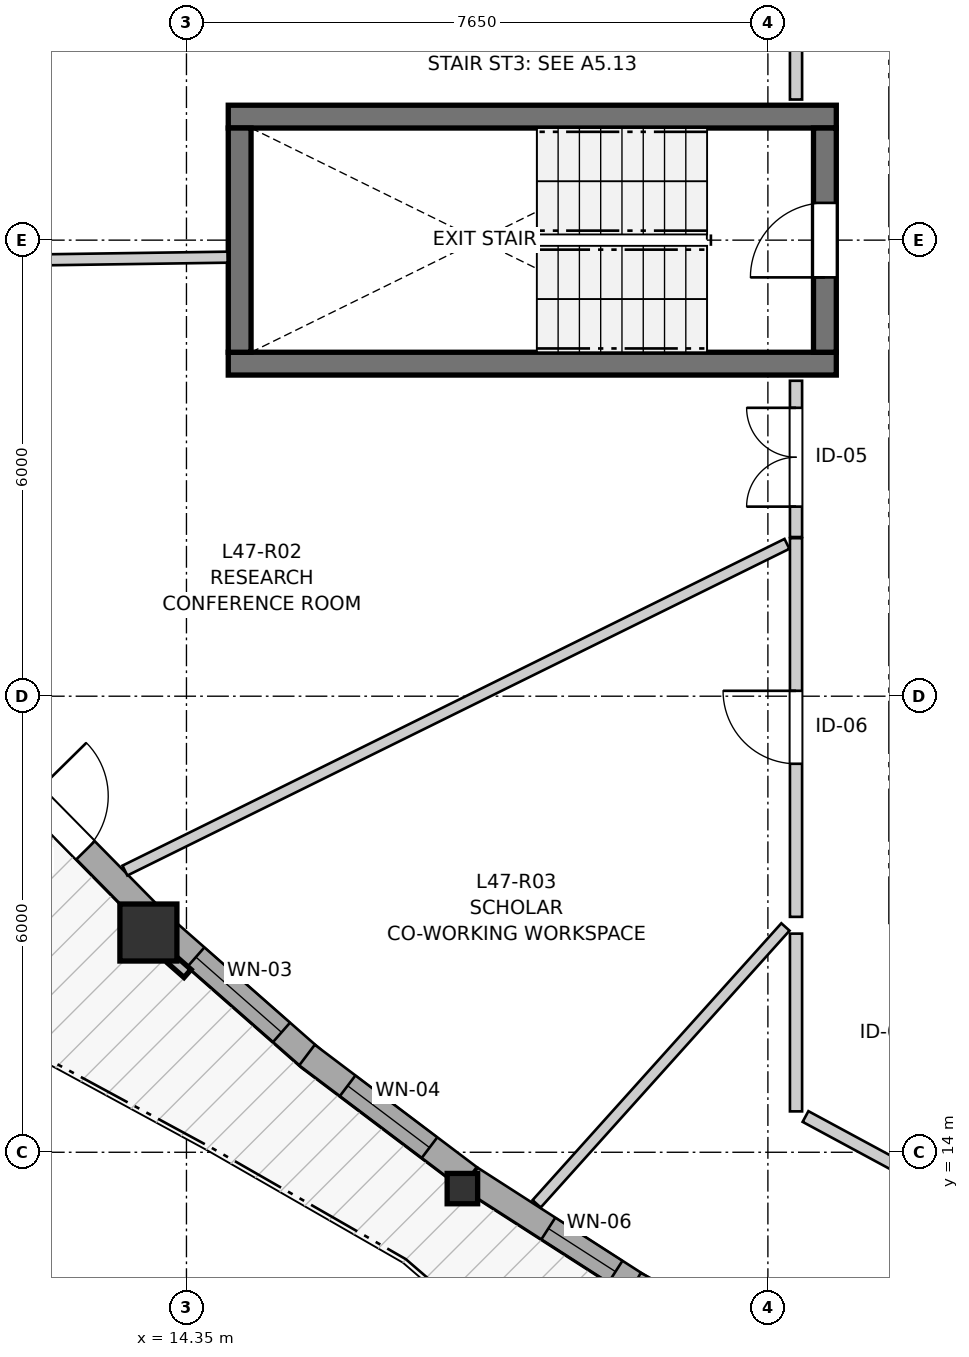
"""IFC4 building model, lengths in metres.
Left out: names, types, materials, properties, quantities, classifications, styles, units other than length and angle.
Written with IfcOpenShell. Run it as: python <this file> out.ifc"""

import sys

from ifc_helpers import new_model, si_unit, direction, frame, frame_2d, origin, origin_2d, place, context, subcontext, project, spatial, rectangle, i_section, extrude, source, transform, mapped, element, fill, save


model = new_model("IFC4")
c1 = context("Model", 3, precision=1e-05, world=origin(), true_north=direction((0.0, 1.0)))
c2 = subcontext(c1, "Body", "Model", "MODEL_VIEW")
j1 = project(units=[si_unit("LENGTHUNIT", "METRE"), si_unit("PLANEANGLEUNIT", "RADIAN")], contexts=[c1])
p1 = place(None, origin())
s1 = spatial("IfcSite", under=j1, at=p1, CompositionType="ELEMENT")
p2 = place(p1, origin())
s2 = spatial("IfcBuilding", under=s1, at=p2, CompositionType="ELEMENT")
p3 = place(p2, frame((0.0, 0.0, 158.6)))
s3 = spatial("IfcBuildingStorey", under=s2, at=p3, CompositionType="ELEMENT", Elevation=158.6)
for number, where, z_axis, x_axis in (
    (1, (14.9, 24.375, 0.0), (0.0, 0.0, 1.0), (1.0, 0.0, 0.0)),
    (2, (22.9, 27.625, 0.0), (0.0, 0.0, 1.0), (-1.0, 0.0, 0.0)),
):
    element("IfcWall", number, at=place(p3, frame(where, z_axis=z_axis, x_axis=x_axis)), inside=s3, PredefinedType="SHEAR", context=c2, shape_type="SweptSolid", body=[
        extrude(rectangle(XDim=8.0, YDim=0.3, at=frame_2d((4.0, 0.0))), origin(), (0.0, 0.0, 1.0), 2.95),
    ])
p4 = place(p3, frame((15.05, 27.475, 0.0), z_axis=(0.0, 0.0, 1.0), x_axis=(0.0, -1.0, 0.0)))
e3 = element("IfcWall", 3, at=p4, inside=s3, PredefinedType="SHEAR", context=c2, shape_type="SweptSolid", body=[
    extrude(rectangle(XDim=2.95, YDim=0.3, at=frame_2d((1.475, 0.0))), origin(), (0.0, 0.0, 1.0), 2.95),
])
p5 = place(p3, frame((22.75, 24.525, 0.0), z_axis=(0.0, 0.0, 1.0), x_axis=(0.0, 1.0, 0.0)))
e4 = element("IfcWall", 4, at=p5, inside=s3, PredefinedType="SHEAR", context=c2, shape_type="SweptSolid", body=[
    extrude(rectangle(XDim=2.95, YDim=0.3, at=frame_2d((1.475, 0.0))), origin(), (0.0, 0.0, 1.0), 2.95),
])
p6 = place(p5, frame((0.985, 0.0, 0.0)))
e5 = element("IfcOpeningElement", 5, at=p6, cuts=e4, PredefinedType="OPENING", context=c2, shape_type="SweptSolid", body=[
    extrude(rectangle(XDim=0.98, YDim=2.15, at=frame_2d((0.49, 1.075))), frame((0.0, 0.16, 0.0), z_axis=(0.0, -1.0, 0.0), x_axis=(1.0, 0.0, 0.0)), (0.0, 0.0, 1.0), 0.32),
])
m1 = source(origin(), c2, "Body", "SweptSolid", [
    extrude(rectangle(XDim=0.75, YDim=0.75, at=origin_2d()), origin(), (0.0, 0.0, 1.0), 2.95),
])
p7 = place(p3, frame((13.849, 16.891, 0.0), z_axis=(0.0, 0.0, 1.0), x_axis=(1.0, 0.0, 0.0)))
e6 = element("IfcColumn", 6, at=p7, inside=s3, PredefinedType="COLUMN", context=c2, shape_type="MappedRepresentation", body=[
    mapped(m1, transform((0.0, 0.0, 0.0), x_axis=(1.0, 0.0, 0.0), y_axis=(0.0, 1.0, 0.0), z_axis=(0.0, 0.0, 1.0), scale=1.0)),
])
m2 = source(origin(), c2, "Body", "SweptSolid", [
    extrude(i_section(OverallWidth=0.401, OverallDepth=0.399, WebThickness=0.023, FlangeThickness=0.036, FilletRadius=0.015, at=origin_2d()), origin(), (0.0, 0.0, 1.0), 2.95),
])
p8 = place(p3, frame((17.98, 13.522, 0.0), z_axis=(0.0, 0.0, 1.0), x_axis=(1.0, 0.0, 0.0)))
e7 = element("IfcColumn", 7, at=p8, inside=s3, PredefinedType="PILASTER", context=c2, shape_type="MappedRepresentation", body=[
    mapped(m2, transform((0.0, 0.0, 0.0), x_axis=(1.0, 0.0, 0.0), y_axis=(0.0, 1.0, 0.0), z_axis=(0.0, 0.0, 1.0), scale=1.0)),
])
p9 = place(p3, frame((12.031, 18.98, 0.0), z_axis=(0.0, 0.0, 1.0), x_axis=(0.701518749222, -0.712650997677, 0.0)))
e8 = element("IfcWall", 8, at=p9, inside=s3, PredefinedType="SOLIDWALL", context=c2, shape_type="SweptSolid", body=[
    extrude(rectangle(XDim=2.61, YDim=0.34, at=frame_2d((1.305, 0.0))), origin(), (0.0, 0.0, 1.0), 2.53),
])
p10 = place(p9, frame((0.413, 0.0, 0.0)))
e9 = element("IfcOpeningElement", 9, at=p10, cuts=e8, PredefinedType="OPENING", context=c2, shape_type="SweptSolid", body=[
    extrude(rectangle(XDim=1.0, YDim=2.1, at=frame_2d((0.5, 1.05))), frame((0.0, 0.18, 0.0), z_axis=(0.0, -1.0, 0.0), x_axis=(1.0, 0.0, 0.0)), (0.0, 0.0, 1.0), 0.36),
])
p11 = place(p3, frame((14.078, 16.916, 0.0), z_axis=(0.0, 0.0, 1.0), x_axis=(0.751177768463, -0.660099962253, 0.0)))
e10 = element("IfcWall", 10, at=p11, inside=s3, PredefinedType="SOLIDWALL", context=c2, shape_type="SweptSolid", body=[
    extrude(rectangle(XDim=2.565, YDim=0.34, at=frame_2d((1.283, 0.0))), origin(), (0.0, 0.0, 1.0), 2.53),
])
p12 = place(p11, frame((0.528, 0.0, 0.82)))
e11 = element("IfcOpeningElement", 11, at=p12, cuts=e10, PredefinedType="OPENING", context=c2, shape_type="SweptSolid", body=[
    extrude(rectangle(XDim=1.5, YDim=1.45, at=frame_2d((0.75, 0.725))), frame((0.0, 0.18, 0.0), z_axis=(0.0, -1.0, 0.0), x_axis=(1.0, 0.0, 0.0)), (0.0, 0.0, 1.0), 0.36),
])
p13 = place(p3, frame((15.936, 15.279, 0.0), z_axis=(0.0, 0.0, 1.0), x_axis=(0.798020729511, -0.602629998649, 0.0)))
e12 = element("IfcWall", 12, at=p13, inside=s3, PredefinedType="SOLIDWALL", context=c2, shape_type="SweptSolid", body=[
    extrude(rectangle(XDim=2.67, YDim=0.34, at=frame_2d((1.335, 0.0))), origin(), (0.0, 0.0, 1.0), 2.53),
])
p14 = place(p13, frame((0.67, 0.0, 0.82)))
e13 = element("IfcOpeningElement", 13, at=p14, cuts=e12, PredefinedType="OPENING", context=c2, shape_type="SweptSolid", body=[
    extrude(rectangle(XDim=1.35, YDim=1.45, at=frame_2d((0.675, 0.725))), frame((0.0, 0.18, 0.0), z_axis=(0.0, -1.0, 0.0), x_axis=(1.0, 0.0, 0.0)), (0.0, 0.0, 1.0), 0.36),
])
p15 = place(p3, frame((18.089, 13.654, 0.0), z_axis=(0.0, 0.0, 1.0), x_axis=(0.841241207466, -0.540659995617, 0.0)))
e14 = element("IfcWall", 14, at=p15, inside=s3, PredefinedType="SOLIDWALL", context=c2, shape_type="SweptSolid", body=[
    extrude(rectangle(XDim=2.655, YDim=0.34, at=frame_2d((1.328, 0.0))), origin(), (0.0, 0.0, 1.0), 2.53),
])
p16 = place(p15, frame((1.215, 0.0, 0.82)))
e15 = element("IfcOpeningElement", 15, at=p16, cuts=e14, PredefinedType="OPENING", context=c2, shape_type="SweptSolid", body=[
    extrude(rectangle(XDim=1.05, YDim=1.45, at=frame_2d((0.525, 0.725))), frame((0.0, 0.18, 0.0), z_axis=(0.0, -1.0, 0.0), x_axis=(1.0, 0.0, 0.0)), (0.0, 0.0, 1.0), 0.36),
])
p17 = place(p3, frame((20.246, 12.264, 0.0), z_axis=(0.0, 0.0, 1.0), x_axis=(0.879813837033, -0.475318432385, 0.0)))
e16 = element("IfcWall", 16, at=p17, inside=s3, PredefinedType="SOLIDWALL", context=c2, shape_type="SweptSolid", body=[
    extrude(rectangle(XDim=2.52, YDim=0.34, at=frame_2d((1.26, 0.0))), origin(), (0.0, 0.0, 1.0), 2.53),
])
p18 = place(p17, frame((0.74, 0.0, 0.82)))
e17 = element("IfcOpeningElement", 17, at=p18, cuts=e16, PredefinedType="OPENING", context=c2, shape_type="SweptSolid", body=[
    extrude(rectangle(XDim=1.05, YDim=1.45, at=frame_2d((0.525, 0.725))), frame((0.0, 0.18, 0.0), z_axis=(0.0, -1.0, 0.0), x_axis=(1.0, 0.0, 0.0)), (0.0, 0.0, 1.0), 0.36),
])
p19 = place(p3, frame((22.37, 27.85, 0.0), z_axis=(0.0, 0.0, 1.0), x_axis=(0.0, 1.0, 0.0)))
e18 = element("IfcWall", 18, at=p19, inside=s3, PredefinedType="PARTITIONING", context=c2, shape_type="SweptSolid", body=[
    extrude(rectangle(XDim=5.294, YDim=0.16, at=frame_2d((2.647, 0.0))), origin(), (0.0, 0.0, 1.0), 2.95),
])
p20 = place(p19, frame((2.341, 0.0, 0.0)))
e19 = element("IfcOpeningElement", 19, at=p20, cuts=e18, PredefinedType="OPENING", context=c2, shape_type="SweptSolid", body=[
    extrude(rectangle(XDim=1.3, YDim=2.1, at=frame_2d((0.65, 1.05))), frame((0.0, 0.09, 0.0), z_axis=(0.0, -1.0, 0.0), x_axis=(1.0, 0.0, 0.0)), (0.0, 0.0, 1.0), 0.18),
])
p21 = place(p3, frame((22.37, 17.097, 0.0), z_axis=(0.0, 0.0, 1.0), x_axis=(0.0, 1.0, 0.0)))
e20 = element("IfcWall", 20, at=p21, inside=s3, PredefinedType="PARTITIONING", context=c2, shape_type="SweptSolid", body=[
    extrude(rectangle(XDim=4.982, YDim=0.16, at=frame_2d((2.491, 0.0))), origin(), (0.0, 0.0, 1.0), 2.95),
])
p22 = place(p21, frame((2.014, 0.0, 0.0)))
e21 = element("IfcOpeningElement", 21, at=p22, cuts=e20, PredefinedType="OPENING", context=c2, shape_type="SweptSolid", body=[
    extrude(rectangle(XDim=0.96, YDim=2.1, at=frame_2d((0.48, 1.05))), frame((0.0, 0.09, 0.0), z_axis=(0.0, -1.0, 0.0), x_axis=(1.0, 0.0, 0.0)), (0.0, 0.0, 1.0), 0.18),
])
p23 = place(p3, frame((22.37, 22.094, 0.0), z_axis=(0.0, 0.0, 1.0), x_axis=(0.0, 1.0, 0.0)))
e22 = element("IfcWall", 22, at=p23, inside=s3, PredefinedType="PARTITIONING", context=c2, shape_type="SweptSolid", body=[
    extrude(rectangle(XDim=2.056, YDim=0.16, at=frame_2d((1.028, 0.0))), origin(), (0.0, 0.0, 1.0), 2.95),
])
p24 = place(p23, frame((0.4, 0.0, 0.0)))
e23 = element("IfcOpeningElement", 23, at=p24, cuts=e22, PredefinedType="OPENING", context=c2, shape_type="SweptSolid", body=[
    extrude(rectangle(XDim=1.3, YDim=2.1, at=frame_2d((0.65, 1.05))), frame((0.0, 0.09, 0.0), z_axis=(0.0, -1.0, 0.0), x_axis=(1.0, 0.0, 0.0)), (0.0, 0.0, 1.0), 0.18),
])
p25 = place(p3, frame((13.54, 17.706, 0.0), z_axis=(0.0, 0.0, 1.0), x_axis=(0.896762400541, 0.442512369291, 0.0)))
e24 = element("IfcWall", 24, at=p25, inside=s3, PredefinedType="PARTITIONING", context=c2, shape_type="SweptSolid", body=[
    extrude(rectangle(XDim=9.713, YDim=0.145, at=frame_2d((4.857, 0.0))), origin(), (0.0, 0.0, 1.0), 2.95),
])
p26 = place(p3, frame((7.689, 25.671, 0.0), z_axis=(0.0, 0.0, 1.0), x_axis=(0.999894747293, 0.014508422953, 0.0)))
e25 = element("IfcWall", 25, at=p26, inside=s3, PredefinedType="PARTITIONING", context=c2, shape_type="SweptSolid", body=[
    extrude(rectangle(XDim=7.202, YDim=0.145, at=frame_2d((3.601, 0.0))), origin(), (0.0, 0.0, 1.0), 2.95),
])
p27 = place(p3, frame((18.957, 13.322, 0.0), z_axis=(0.0, 0.0, 1.0), x_axis=(0.66841369867, 0.743789706456, 0.0)))
e26 = element("IfcWall", 26, at=p27, inside=s3, PredefinedType="PARTITIONING", context=c2, shape_type="SweptSolid", body=[
    extrude(rectangle(XDim=4.897, YDim=0.145, at=frame_2d((2.449, 0.0))), origin(), (0.0, 0.0, 1.0), 2.95),
])
p28 = place(p3, frame((22.37, 14.538, 0.0), z_axis=(0.0, 0.0, 1.0), x_axis=(0.0, 1.0, 0.0)))
e27 = element("IfcWall", 27, at=p28, inside=s3, PredefinedType="PARTITIONING", context=c2, shape_type="SweptSolid", body=[
    extrude(rectangle(XDim=2.338, YDim=0.16, at=frame_2d((1.169, 0.0))), origin(), (0.0, 0.0, 1.0), 2.95),
])
p29 = place(p3, frame((22.495, 14.47, 0.0), z_axis=(0.0, 0.0, 1.0), x_axis=(0.879828765098, -0.475290799517, 0.0)))
e28 = element("IfcWall", 28, at=p29, inside=s3, PredefinedType="PARTITIONING", context=c2, shape_type="SweptSolid", body=[
    extrude(rectangle(XDim=1.625, YDim=0.16, at=frame_2d((0.812, 0.0))), origin(), (0.0, 0.0, 1.0), 2.95),
])
m3 = source(origin(), c2, "Body", "SweptSolid", [
    extrude(rectangle(XDim=1.5, YDim=1.45, at=frame_2d((0.75, 0.725))), frame((0.0, 0.03, 0.0), z_axis=(0.0, -1.0, 0.0), x_axis=(1.0, 0.0, 0.0)), (0.0, 0.0, 1.0), 0.06),
])
p30 = place(p12, origin())
e29 = element("IfcWindow", 29, at=p30, inside=s3, PartitioningType="SINGLE_PANEL", PredefinedType="WINDOW", context=c2, shape_type="MappedRepresentation", body=[
    mapped(m3, transform((0.0, 0.0, 0.0), x_axis=(1.0, 0.0, 0.0), y_axis=(0.0, 1.0, 0.0), z_axis=(0.0, 0.0, 1.0), scale=1.0)),
])
fill(e11, e29)
m4 = source(origin(), c2, "Body", "SweptSolid", [
    extrude(rectangle(XDim=1.35, YDim=1.45, at=frame_2d((0.675, 0.725))), frame((0.0, 0.03, 0.0), z_axis=(0.0, -1.0, 0.0), x_axis=(1.0, 0.0, 0.0)), (0.0, 0.0, 1.0), 0.06),
])
p31 = place(p14, origin())
e30 = element("IfcWindow", 30, at=p31, inside=s3, PartitioningType="SINGLE_PANEL", PredefinedType="WINDOW", context=c2, shape_type="MappedRepresentation", body=[
    mapped(m4, transform((0.0, 0.0, 0.0), x_axis=(1.0, 0.0, 0.0), y_axis=(0.0, 1.0, 0.0), z_axis=(0.0, 0.0, 1.0), scale=1.0)),
])
fill(e13, e30)
m5 = source(origin(), c2, "Body", "SweptSolid", [
    extrude(rectangle(XDim=1.05, YDim=1.45, at=frame_2d((0.525, 0.725))), frame((0.0, 0.03, 0.0), z_axis=(0.0, -1.0, 0.0), x_axis=(1.0, 0.0, 0.0)), (0.0, 0.0, 1.0), 0.06),
])
p32 = place(p16, origin())
e31 = element("IfcWindow", 31, at=p32, inside=s3, PartitioningType="SINGLE_PANEL", PredefinedType="WINDOW", context=c2, shape_type="MappedRepresentation", body=[
    mapped(m5, transform((0.0, 0.0, 0.0), x_axis=(1.0, 0.0, 0.0), y_axis=(0.0, 1.0, 0.0), z_axis=(0.0, 0.0, 1.0), scale=1.0)),
])
fill(e15, e31)
m6 = source(origin(), c2, "Body", "SweptSolid", [
    extrude(rectangle(XDim=1.0, YDim=2.1, at=frame_2d((0.5, 1.05))), frame((0.0, 0.025, 0.0), z_axis=(0.0, -1.0, 0.0), x_axis=(1.0, 0.0, 0.0)), (0.0, 0.0, 1.0), 0.05),
])
p33 = place(p10, origin())
e32 = element("IfcDoor", 32, at=p33, inside=s3, OperationType="SINGLE_SWING_LEFT", PredefinedType="DOOR", context=c2, shape_type="MappedRepresentation", body=[
    mapped(m6, transform((0.0, 0.0, 0.0), x_axis=(1.0, 0.0, 0.0), y_axis=(0.0, 1.0, 0.0), z_axis=(0.0, 0.0, 1.0), scale=1.0)),
])
fill(e9, e32)
m7 = source(origin(), c2, "Body", "SweptSolid", [
    extrude(rectangle(XDim=0.98, YDim=2.15, at=frame_2d((0.49, 1.075))), frame((0.0, 0.025, 0.0), z_axis=(0.0, -1.0, 0.0), x_axis=(1.0, 0.0, 0.0)), (0.0, 0.0, 1.0), 0.05),
])
p34 = place(p6, origin())
e33 = element("IfcDoor", 33, at=p34, inside=s3, OperationType="SINGLE_SWING_LEFT", PredefinedType="DOOR", context=c2, shape_type="MappedRepresentation", body=[
    mapped(m7, transform((0.0, 0.0, 0.0), x_axis=(1.0, 0.0, 0.0), y_axis=(0.0, 1.0, 0.0), z_axis=(0.0, 0.0, 1.0), scale=1.0)),
])
fill(e5, e33)
m8 = source(origin(), c2, "Body", "SweptSolid", [
    extrude(rectangle(XDim=0.96, YDim=2.1, at=frame_2d((0.48, 1.05))), frame((0.0, 0.025, 0.0), z_axis=(0.0, -1.0, 0.0), x_axis=(1.0, 0.0, 0.0)), (0.0, 0.0, 1.0), 0.05),
])
p35 = place(p22, origin())
e34 = element("IfcDoor", 34, at=p35, inside=s3, OperationType="SINGLE_SWING_RIGHT", PredefinedType="DOOR", context=c2, shape_type="MappedRepresentation", body=[
    mapped(m8, transform((0.0, 0.0, 0.0), x_axis=(1.0, 0.0, 0.0), y_axis=(0.0, 1.0, 0.0), z_axis=(0.0, 0.0, 1.0), scale=1.0)),
])
fill(e21, e34)
m9 = source(origin(), c2, "Body", "SweptSolid", [
    extrude(rectangle(XDim=1.3, YDim=2.1, at=frame_2d((0.65, 1.05))), frame((0.0, 0.025, 0.0), z_axis=(0.0, -1.0, 0.0), x_axis=(1.0, 0.0, 0.0)), (0.0, 0.0, 1.0), 0.05),
])
p36 = place(p24, origin())
e35 = element("IfcDoor", 35, at=p36, inside=s3, OperationType="DOUBLE_DOOR_SINGLE_SWING", PredefinedType="DOOR", context=c2, shape_type="MappedRepresentation", body=[
    mapped(m9, transform((0.0, 0.0, 0.0), x_axis=(1.0, 0.0, 0.0), y_axis=(0.0, 1.0, 0.0), z_axis=(0.0, 0.0, 1.0), scale=1.0)),
])
fill(e23, e35)
save(model, sys.argv[1])
